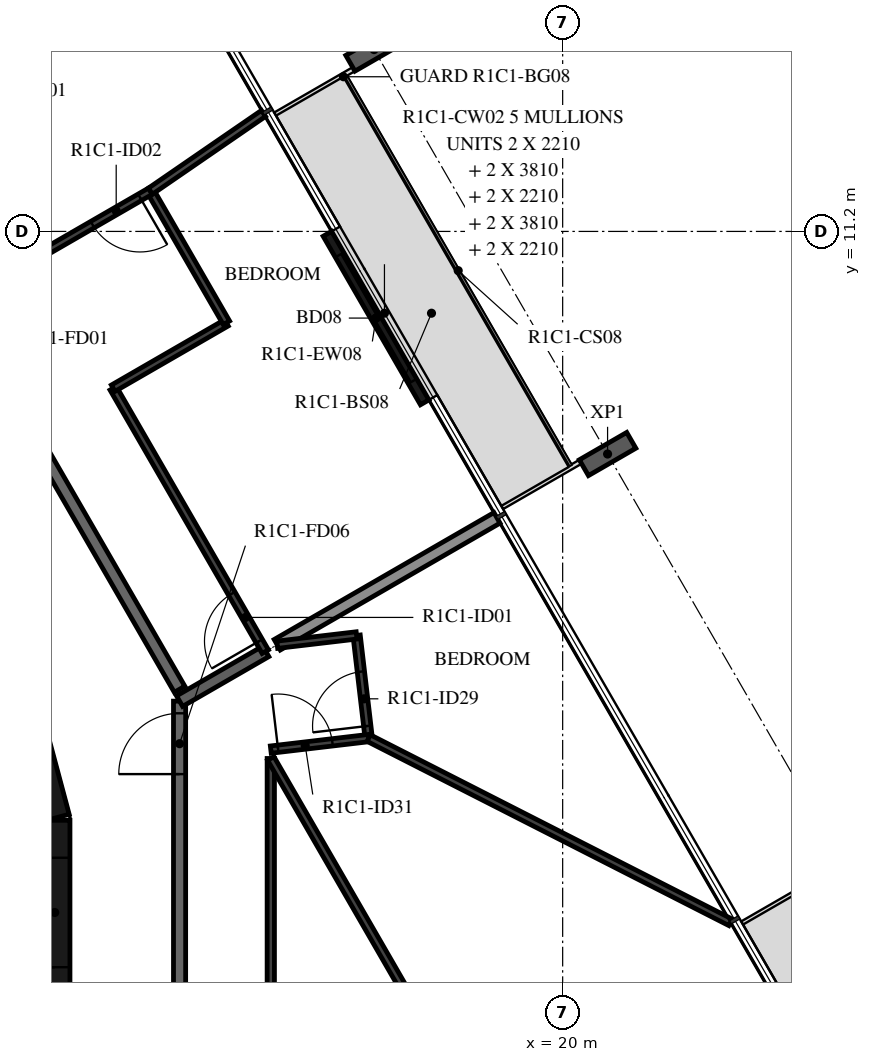
"""IFC4 building model, lengths in metres.
Left out: names, types, materials, properties, quantities, classifications, styles, units other than length and angle.
Written with IfcOpenShell. Run it as: python <this file> out.ifc"""

import sys

from ifc_helpers import new_model, si_unit, direction, frame, frame_2d, origin, origin_2d, place, context, subcontext, project, spatial, rectangle, i_section, extrude, element, fill, save


model = new_model("IFC4")
c1 = context("Model", 3, precision=1e-05, world=origin(), true_north=direction((0.0, 1.0)))
c2 = subcontext(c1, "Body", "Model", "MODEL_VIEW")
j1 = project(units=[si_unit("LENGTHUNIT", "METRE"), si_unit("PLANEANGLEUNIT", "RADIAN")], contexts=[c1])
p1 = place(None, origin())
s1 = spatial("IfcSite", under=j1, at=p1, CompositionType="ELEMENT")
p2 = place(p1, origin())
s2 = spatial("IfcBuilding", under=s1, at=p2, CompositionType="ELEMENT")
p3 = place(p2, frame((0.0, 0.0, 62.9)))
s3 = spatial("IfcBuildingStorey", under=s2, at=p3, CompositionType="ELEMENT", Elevation=62.9)
for number, where, z_axis, x_axis in (
    (1, (20.739, 7.539, -0.38), (0.0, 0.0, 1.0), (0.5, -0.866, 0.0)),
    (2, (16.899, 14.19, -0.38), (0.0, 0.0, 1.0), (0.5, -0.866, 0.0)),
):
    element("IfcColumn", number, at=place(p3, frame(where, z_axis=z_axis, x_axis=x_axis)), inside=s3, PredefinedType="COLUMN", context=c2, shape_type="SweptSolid", body=[
        extrude(i_section(OverallWidth=0.3, OverallDepth=0.9, WebThickness=0.019, FlangeThickness=0.035, FilletRadius=0.03, at=origin_2d()), origin(), (0.0, 0.0, 1.0), 3.5),
    ])
p4 = place(p3, frame((17.731, 8.389, 0.0), z_axis=(0.0, 0.0, 1.0), x_axis=(-0.500028443584, 0.866008981251, 0.0)))
e3 = element("IfcWall", 3, at=p4, inside=s3, PredefinedType="STANDARD", context=c2, shape_type="SweptSolid", body=[
    extrude(rectangle(XDim=3.2, YDim=0.16, at=frame_2d((1.6, 0.0))), origin(), (0.0, 0.0, 1.0), 3.12),
])
p5 = place(p4, frame((0.4, 0.0, 0.0)))
e4 = element("IfcOpeningElement", 4, at=p5, cuts=e3, PredefinedType="OPENING", context=c2, shape_type="SweptSolid", body=[
    extrude(rectangle(XDim=2.4, YDim=2.4, at=frame_2d((1.2, 1.2))), frame((0.0, 0.09, 0.0), z_axis=(0.0, -1.0, 0.0), x_axis=(1.0, 0.0, 0.0)), (0.0, 0.0, 1.0), 0.18),
])
p6 = place(p3, frame((11.647, -1.516, 0.0), z_axis=(0.0, 0.0, 1.0), x_axis=(0.0, 1.0, 0.0)))
e5 = element("IfcWall", 5, at=p6, inside=s3, PredefinedType="SHEAR", context=c2, shape_type="SweptSolid", body=[
    extrude(rectangle(XDim=3.033, YDim=0.5, at=frame_2d((1.516, 0.0))), origin(), (0.0, 0.0, 1.0), 3.12),
])
p7 = place(p6, frame((0.616, 0.0, 0.0)))
e6 = element("IfcOpeningElement", 6, at=p7, cuts=e5, PredefinedType="OPENING", context=c2, shape_type="SweptSolid", body=[
    extrude(rectangle(XDim=1.8, YDim=2.1, at=frame_2d((0.9, 1.05))), frame((0.0, 0.26, 0.0), z_axis=(0.0, -1.0, 0.0), x_axis=(1.0, 0.0, 0.0)), (0.0, 0.0, 1.0), 0.52),
])
p8 = place(p3, frame((11.643, 1.55, 0.0), z_axis=(0.0, 0.0, 1.0), x_axis=(-0.258734743916, 0.965948410781, 0.0)))
e7 = element("IfcWall", 7, at=p8, inside=s3, PredefinedType="SHEAR", context=c2, shape_type="SweptSolid", body=[
    extrude(rectangle(XDim=3.033, YDim=0.5, at=frame_2d((1.516, 0.0))), origin(), (0.0, 0.0, 1.0), 3.12),
])
p9 = place(p3, frame((13.7, 3.671, 0.0), z_axis=(0.0, 0.0, 1.0), x_axis=(-0.500001669485, 0.866024439905, 0.0)))
e8 = element("IfcWall", 8, at=p9, inside=s3, PredefinedType="STANDARD", context=c2, shape_type="SweptSolid", body=[
    extrude(rectangle(XDim=7.342, YDim=0.2, at=frame_2d((3.671, 0.0))), origin(), (0.0, 0.0, 1.0), 3.12),
])
p10 = place(p9, frame((6.142, 0.0, 0.0)))
e9 = element("IfcOpeningElement", 9, at=p10, cuts=e8, PredefinedType="OPENING", context=c2, shape_type="SweptSolid", body=[
    extrude(rectangle(XDim=1.0, YDim=2.1, at=frame_2d((0.5, 1.05))), frame((0.0, 0.11, 0.0), z_axis=(0.0, -1.0, 0.0), x_axis=(1.0, 0.0, 0.0)), (0.0, 0.0, 1.0), 0.22),
])
p11 = place(p3, frame((13.7, -3.671, 0.0), z_axis=(0.0, 0.0, 1.0), x_axis=(0.0, 1.0, 0.0)))
e10 = element("IfcWall", 10, at=p11, inside=s3, PredefinedType="STANDARD", context=c2, shape_type="SweptSolid", body=[
    extrude(rectangle(XDim=7.146, YDim=0.2, at=frame_2d((3.573, 0.0))), origin(), (0.0, 0.0, 1.0), 3.12),
])
p12 = place(p11, frame((5.947, 0.0, 0.0)))
e11 = element("IfcOpeningElement", 11, at=p12, cuts=e10, PredefinedType="OPENING", context=c2, shape_type="SweptSolid", body=[
    extrude(rectangle(XDim=1.0, YDim=2.1, at=frame_2d((0.5, 1.05))), frame((0.0, 0.11, 0.0), z_axis=(0.0, -1.0, 0.0), x_axis=(1.0, 0.0, 0.0)), (0.0, 0.0, 1.0), 0.22),
])
p13 = place(p3, frame((13.7, 3.476, 0.0), z_axis=(0.0, 0.0, 1.0), x_axis=(0.866014281772, 0.500019263395, 0.0)))
e12 = element("IfcWall", 12, at=p13, inside=s3, PredefinedType="STANDARD", context=c2, shape_type="SweptSolid", body=[
    extrude(rectangle(XDim=1.638, YDim=0.2, at=frame_2d((0.819, 0.0))), origin(), (0.0, 0.0, 1.0), 3.12),
])
p14 = place(p3, frame((15.306, 4.403, 0.0), z_axis=(0.0, 0.0, 1.0), x_axis=(0.866013143551, 0.500021234745, 0.0)))
e13 = element("IfcWall", 13, at=p14, inside=s3, PredefinedType="STANDARD", context=c2, shape_type="SweptSolid", body=[
    extrude(rectangle(XDim=4.173, YDim=0.2, at=frame_2d((2.086, 0.0))), origin(), (0.0, 0.0, 1.0), 2.73),
])
p15 = place(p3, frame((15.11, 4.289, 0.0), z_axis=(0.0, 0.0, 1.0), x_axis=(-0.500033654285, 0.866005972602, 0.0)))
e14 = element("IfcWall", 14, at=p15, inside=s3, PredefinedType="PARTITIONING", context=c2, shape_type="SweptSolid", body=[
    extrude(rectangle(XDim=5.003, YDim=0.12, at=frame_2d((2.501, 0.0))), origin(), (0.0, 0.0, 1.0), 3.12),
])
p16 = place(p15, frame((0.2, 0.0, 0.0)))
e15 = element("IfcOpeningElement", 15, at=p16, cuts=e14, PredefinedType="OPENING", context=c2, shape_type="SweptSolid", body=[
    extrude(rectangle(XDim=0.9, YDim=2.1, at=frame_2d((0.45, 1.05))), frame((0.0, 0.07, 0.0), z_axis=(0.0, -1.0, 0.0), x_axis=(1.0, 0.0, 0.0)), (0.0, 0.0, 1.0), 0.14),
])
p17 = place(p3, frame((12.608, 8.622, 0.0), z_axis=(0.0, 0.0, 1.0), x_axis=(0.866005997533, 0.500033611107, 0.0)))
e16 = element("IfcWall", 16, at=p17, inside=s3, PredefinedType="PARTITIONING", context=c2, shape_type="SweptSolid", body=[
    extrude(rectangle(XDim=2.151, YDim=0.12, at=frame_2d((1.075, 0.0))), origin(), (0.0, 0.0, 1.0), 3.12),
])
p18 = place(p3, frame((14.471, 9.697, 0.0), z_axis=(0.0, 0.0, 1.0), x_axis=(-0.500004234368, 0.866022959057, 0.0)))
e17 = element("IfcWall", 17, at=p18, inside=s3, PredefinedType="PARTITIONING", context=c2, shape_type="SweptSolid", body=[
    extrude(rectangle(XDim=2.5, YDim=0.12, at=frame_2d((1.25, 0.0))), origin(), (0.0, 0.0, 1.0), 3.12),
])
p19 = place(p3, frame((13.221, 11.862, 0.0), z_axis=(0.0, 0.0, 1.0), x_axis=(-0.866055151781, -0.499948471418, 0.0)))
e18 = element("IfcWall", 18, at=p19, inside=s3, PredefinedType="PARTITIONING", context=c2, shape_type="SweptSolid", body=[
    extrude(rectangle(XDim=2.151, YDim=0.12, at=frame_2d((1.075, 0.0))), origin(), (0.0, 0.0, 1.0), 3.12),
])
p20 = place(p19, frame((0.2, 0.0, 0.0)))
e19 = element("IfcOpeningElement", 19, at=p20, cuts=e18, PredefinedType="OPENING", context=c2, shape_type="SweptSolid", body=[
    extrude(rectangle(XDim=0.9, YDim=2.1, at=frame_2d((0.45, 1.05))), frame((0.0, 0.07, 0.0), z_axis=(0.0, -1.0, 0.0), x_axis=(1.0, 0.0, 0.0)), (0.0, 0.0, 1.0), 0.14),
])
p21 = place(p3, frame((15.08, 13.14, 0.0), z_axis=(0.0, 0.0, 1.0), x_axis=(-0.824041924199, -0.566528822887, 0.0)))
e20 = element("IfcWall", 20, at=p21, inside=s3, PredefinedType="PARTITIONING", context=c2, shape_type="SweptSolid", body=[
    extrude(rectangle(XDim=2.256, YDim=0.12, at=frame_2d((1.128, 0.0))), origin(), (0.0, 0.0, 1.0), 2.73),
])
p22 = place(p3, frame((16.81, 2.868, 0.0), z_axis=(0.0, 0.0, 1.0), x_axis=(-0.117049566217, 0.993126074096, 0.0)))
e21 = element("IfcWall", 21, at=p22, inside=s3, PredefinedType="PARTITIONING", context=c2, shape_type="SweptSolid", body=[
    extrude(rectangle(XDim=1.7, YDim=0.12, at=frame_2d((0.85, 0.0))), origin(), (0.0, 0.0, 1.0), 3.12),
])
p23 = place(p22, frame((0.2, 0.0, 0.0)))
e22 = element("IfcOpeningElement", 22, at=p23, cuts=e21, PredefinedType="OPENING", context=c2, shape_type="SweptSolid", body=[
    extrude(rectangle(XDim=0.9, YDim=2.1, at=frame_2d((0.45, 1.05))), frame((0.0, 0.07, 0.0), z_axis=(0.0, -1.0, 0.0), x_axis=(1.0, 0.0, 0.0)), (0.0, 0.0, 1.0), 0.14),
])
p24 = place(p3, frame((16.611, 4.556, 0.0), z_axis=(0.0, 0.0, 1.0), x_axis=(-0.993151872114, -0.116830470836, 0.0)))
e23 = element("IfcWall", 23, at=p24, inside=s3, PredefinedType="PARTITIONING", context=c2, shape_type="SweptSolid", body=[
    extrude(rectangle(XDim=1.314, YDim=0.12, at=frame_2d((0.657, 0.0))), origin(), (0.0, 0.0, 1.0), 3.12),
])
p25 = place(p3, frame((15.2, 2.679, 0.0), z_axis=(0.0, 0.0, 1.0), x_axis=(0.993150604323, 0.116841247567, 0.0)))
e24 = element("IfcWall", 24, at=p25, inside=s3, PredefinedType="PARTITIONING", context=c2, shape_type="SweptSolid", body=[
    extrude(rectangle(XDim=1.621, YDim=0.12, at=frame_2d((0.811, 0.0))), origin(), (0.0, 0.0, 1.0), 3.12),
])
p26 = place(p25, frame((0.12, 0.0, 0.0)))
e25 = element("IfcOpeningElement", 25, at=p26, cuts=e24, PredefinedType="OPENING", context=c2, shape_type="SweptSolid", body=[
    extrude(rectangle(XDim=0.9, YDim=2.1, at=frame_2d((0.45, 1.05))), frame((0.0, 0.07, 0.0), z_axis=(0.0, -1.0, 0.0), x_axis=(1.0, 0.0, 0.0)), (0.0, 0.0, 1.0), 0.14),
])
p27 = place(p3, frame((15.2, -4.055, 0.0), z_axis=(0.0, 0.0, 1.0), x_axis=(0.0, 1.0, 0.0)))
e26 = element("IfcWall", 26, at=p27, inside=s3, PredefinedType="PARTITIONING", context=c2, shape_type="SweptSolid", body=[
    extrude(rectangle(XDim=6.588, YDim=0.12, at=frame_2d((3.294, 0.0))), origin(), (0.0, 0.0, 1.0), 3.12),
])
p28 = place(p27, frame((0.4, 0.0, 0.0)))
e27 = element("IfcOpeningElement", 27, at=p28, cuts=e26, PredefinedType="OPENING", context=c2, shape_type="SweptSolid", body=[
    extrude(rectangle(XDim=0.8, YDim=2.1, at=frame_2d((0.4, 1.05))), frame((0.0, 0.07, 0.0), z_axis=(0.0, -1.0, 0.0), x_axis=(1.0, 0.0, 0.0)), (0.0, 0.0, 1.0), 0.14),
])
p29 = place(p3, frame((16.81, 2.868, 0.0), z_axis=(0.0, 0.0, 1.0), x_axis=(0.891097252128, -0.453812392128, 0.0)))
e28 = element("IfcWall", 28, at=p29, inside=s3, PredefinedType="PARTITIONING", context=c2, shape_type="SweptSolid", body=[
    extrude(rectangle(XDim=6.677, YDim=0.12, at=frame_2d((3.338, 0.0))), origin(), (0.0, 0.0, 1.0), 3.12),
])
p30 = place(p3, frame((15.2, 2.533, 0.0), z_axis=(0.0, 0.0, 1.0), x_axis=(0.500001127339, -0.866024752914, 0.0)))
e29 = element("IfcWall", 29, at=p30, inside=s3, PredefinedType="PARTITIONING", context=c2, shape_type="SweptSolid", body=[
    extrude(rectangle(XDim=14.434, YDim=0.12, at=frame_2d((7.217, 0.0))), origin(), (0.0, 0.0, 1.0), 3.12),
])
p31 = place(p30, frame((11.97, 0.0, 0.0)))
e30 = element("IfcOpeningElement", 30, at=p31, cuts=e29, PredefinedType="OPENING", context=c2, shape_type="SweptSolid", body=[
    extrude(rectangle(XDim=0.9, YDim=2.1, at=frame_2d((0.45, 1.05))), frame((0.0, 0.07, 0.0), z_axis=(0.0, -1.0, 0.0), x_axis=(1.0, 0.0, 0.0)), (0.0, 0.0, 1.0), 0.14),
])
p32 = place(p5, origin())
e31 = element("IfcDoor", 31, at=p32, inside=s3, OperationType="DOUBLE_DOOR_SLIDING", PredefinedType="DOOR", context=c2, shape_type="SweptSolid", body=[
    extrude(rectangle(XDim=2.4, YDim=2.4, at=frame_2d((1.2, 1.2))), frame((0.0, 0.025, 0.0), z_axis=(0.0, -1.0, 0.0), x_axis=(1.0, 0.0, 0.0)), (0.0, 0.0, 1.0), 0.05),
])
fill(e4, e31)
p33 = place(p7, origin())
e32 = element("IfcDoor", 32, at=p33, inside=s3, OperationType="DOUBLE_DOOR_SINGLE_SWING", PredefinedType="DOOR", context=c2, shape_type="SweptSolid", body=[
    extrude(rectangle(XDim=1.8, YDim=2.1, at=frame_2d((0.9, 1.05))), frame((0.0, 0.025, 0.0), z_axis=(0.0, -1.0, 0.0), x_axis=(1.0, 0.0, 0.0)), (0.0, 0.0, 1.0), 0.05),
])
fill(e6, e32)
p34 = place(p16, origin())
e33 = element("IfcDoor", 33, at=p34, inside=s3, OperationType="SINGLE_SWING_LEFT", PredefinedType="DOOR", context=c2, shape_type="SweptSolid", body=[
    extrude(rectangle(XDim=0.9, YDim=2.1, at=frame_2d((0.45, 1.05))), frame((0.0, 0.025, 0.0), z_axis=(0.0, -1.0, 0.0), x_axis=(1.0, 0.0, 0.0)), (0.0, 0.0, 1.0), 0.05),
])
fill(e15, e33)
p35 = place(p20, origin())
e34 = element("IfcDoor", 34, at=p35, inside=s3, OperationType="SINGLE_SWING_RIGHT", PredefinedType="DOOR", context=c2, shape_type="SweptSolid", body=[
    extrude(rectangle(XDim=0.9, YDim=2.1, at=frame_2d((0.45, 1.05))), frame((0.0, 0.025, 0.0), z_axis=(0.0, -1.0, 0.0), x_axis=(1.0, 0.0, 0.0)), (0.0, 0.0, 1.0), 0.05),
])
fill(e19, e34)
p36 = place(p12, origin())
e35 = element("IfcDoor", 35, at=p36, inside=s3, OperationType="SINGLE_SWING_LEFT", PredefinedType="DOOR", context=c2, shape_type="SweptSolid", body=[
    extrude(rectangle(XDim=1.0, YDim=2.1, at=frame_2d((0.5, 1.05))), frame((0.0, 0.025, 0.0), z_axis=(0.0, -1.0, 0.0), x_axis=(1.0, 0.0, 0.0)), (0.0, 0.0, 1.0), 0.05),
])
fill(e11, e35)
p37 = place(p23, origin())
e36 = element("IfcDoor", 36, at=p37, inside=s3, OperationType="SINGLE_SWING_LEFT", PredefinedType="DOOR", context=c2, shape_type="SweptSolid", body=[
    extrude(rectangle(XDim=0.9, YDim=2.1, at=frame_2d((0.45, 1.05))), frame((0.0, 0.025, 0.0), z_axis=(0.0, -1.0, 0.0), x_axis=(1.0, 0.0, 0.0)), (0.0, 0.0, 1.0), 0.05),
])
fill(e22, e36)
p38 = place(p26, origin())
e37 = element("IfcDoor", 37, at=p38, inside=s3, OperationType="SINGLE_SWING_RIGHT", PredefinedType="DOOR", context=c2, shape_type="SweptSolid", body=[
    extrude(rectangle(XDim=0.9, YDim=2.1, at=frame_2d((0.45, 1.05))), frame((0.0, 0.025, 0.0), z_axis=(0.0, -1.0, 0.0), x_axis=(1.0, 0.0, 0.0)), (0.0, 0.0, 1.0), 0.05),
])
fill(e25, e37)
save(model, sys.argv[1])
